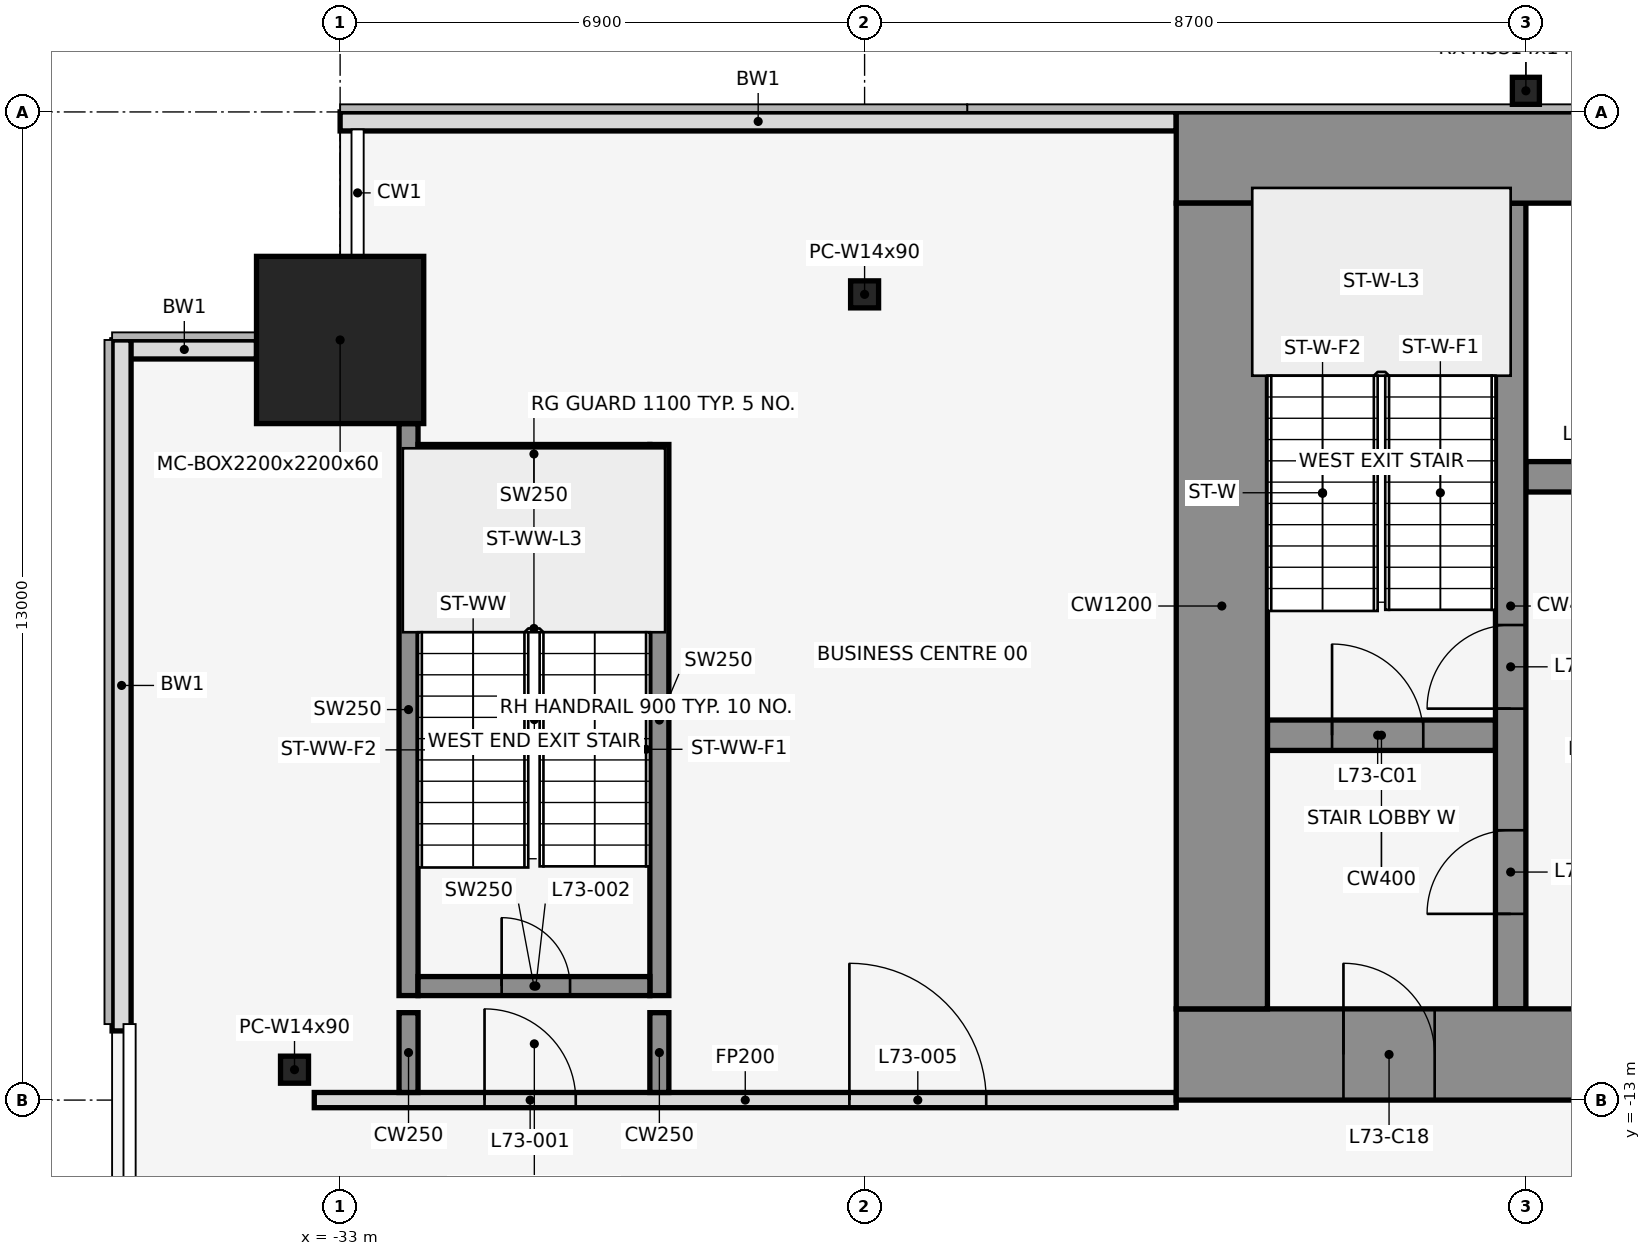
"""IFC4 building model, lengths in metres.
Left out: names, types, materials, properties, quantities, classifications, styles, units other than length and angle.
Written with IfcOpenShell. Run it as: python <this file> out.ifc"""

import sys

from ifc_helpers import new_model, si_unit, direction, frame, frame_2d, origin, origin_2d, place, context, subcontext, project, spatial, rectangle, hollow_rectangle, i_section, extrude, element, fill, save


model = new_model("IFC4")
c1 = context("Model", 3, precision=1e-05, world=origin(), true_north=direction((0.0, 1.0)))
c2 = subcontext(c1, "Body", "Model", "MODEL_VIEW")
j1 = project(units=[si_unit("LENGTHUNIT", "METRE"), si_unit("PLANEANGLEUNIT", "RADIAN")], contexts=[c1])
p1 = place(None, origin())
s1 = spatial("IfcSite", under=j1, at=p1, CompositionType="ELEMENT")
p2 = place(p1, origin())
s2 = spatial("IfcBuilding", under=s1, at=p2, CompositionType="ELEMENT")
p3 = place(p2, frame((0.0, 0.0, 324.5)))
s3 = spatial("IfcBuildingStorey", under=s2, at=p3, CompositionType="ELEMENT", Elevation=324.5)
p4 = place(p3, frame((-33.0, -3.0, 0.0), z_axis=(0.0, 0.0, 1.0), x_axis=(1.0, 0.0, 0.0)))
e1 = element("IfcColumn", 1, at=p4, inside=s3, PredefinedType="COLUMN", context=c2, shape_type="SweptSolid", body=[
    extrude(hollow_rectangle(XDim=2.2, YDim=2.2, WallThickness=0.06, at=origin_2d()), origin(), (0.0, 0.0, 1.0), 4.5),
])
p5 = place(p3, frame((-26.1, -2.4, 0.0), z_axis=(0.0, 0.0, 1.0), x_axis=(1.0, 0.0, 0.0)))
e2 = element("IfcColumn", 2, at=p5, inside=s3, PredefinedType="COLUMN", context=c2, shape_type="SweptSolid", body=[
    extrude(i_section(OverallWidth=0.368, OverallDepth=0.356, WebThickness=0.011, FlangeThickness=0.018, at=origin_2d()), origin(), (0.0, 0.0, 1.0), 4.5),
])
p6 = place(p3, frame((-17.4, 0.278, 0.0), z_axis=(0.0, 0.0, 1.0), x_axis=(1.0, 0.0, 0.0)))
e3 = element("IfcColumn", 3, at=p6, inside=s3, PredefinedType="COLUMN", context=c2, shape_type="SweptSolid", body=[
    extrude(hollow_rectangle(XDim=0.356, YDim=0.356, WallThickness=0.012, at=origin_2d()), origin(), (0.0, 0.0, 1.0), 4.5),
])
p7 = place(p3, frame((-33.6, -12.6, 0.0), z_axis=(0.0, 0.0, 1.0), x_axis=(1.0, 0.0, 0.0)))
e4 = element("IfcColumn", 4, at=p7, inside=s3, PredefinedType="COLUMN", context=c2, shape_type="SweptSolid", body=[
    extrude(i_section(OverallWidth=0.368, OverallDepth=0.356, WebThickness=0.011, FlangeThickness=0.018, at=origin_2d()), origin(), (0.0, 0.0, 1.0), 4.5),
])
p8 = place(p3, frame((-22.0, -0.125, 0.0), z_axis=(0.0, 0.0, 1.0), x_axis=(-1.0, 0.0, 0.0)))
e5 = element("IfcWall", 5, at=p8, inside=s3, PredefinedType="STANDARD", context=c2, shape_type="SweptSolid", body=[
    extrude(rectangle(XDim=11.0, YDim=0.25, at=frame_2d((5.5, 0.0))), origin(), (0.0, 0.0, 1.0), 4.35),
])
p9 = place(p3, frame((-34.1, -3.125, 0.0), z_axis=(0.0, 0.0, 1.0), x_axis=(-1.0, 0.0, 0.0)))
e6 = element("IfcWall", 6, at=p9, inside=s3, PredefinedType="STANDARD", context=c2, shape_type="SweptSolid", body=[
    extrude(rectangle(XDim=1.9, YDim=0.25, at=frame_2d((0.95, 0.0))), origin(), (0.0, 0.0, 1.0), 4.35),
])
p10 = place(p3, frame((-35.875, -3.0, 0.0), z_axis=(0.0, 0.0, 1.0), x_axis=(0.0, -1.0, 0.0)))
e7 = element("IfcWall", 7, at=p10, inside=s3, PredefinedType="STANDARD", context=c2, shape_type="SweptSolid", body=[
    extrude(rectangle(XDim=9.09, YDim=0.25, at=frame_2d((4.545, 0.0))), origin(), (0.0, 0.0, 1.0), 4.35),
])
p11 = place(p3, frame((-32.1, -11.625, 0.0), z_axis=(0.0, 0.0, 1.0), x_axis=(0.0, 1.0, 0.0)))
e8 = element("IfcWall", 8, at=p11, inside=s3, PredefinedType="SHEAR", context=c2, shape_type="SweptSolid", body=[
    extrude(rectangle(XDim=7.525, YDim=0.25, at=frame_2d((3.762, 0.0))), origin(), (0.0, 0.0, 1.0), 4.5),
])
p12 = place(p3, frame((-28.8, -11.625, 0.0), z_axis=(0.0, 0.0, 1.0), x_axis=(0.0, 1.0, 0.0)))
e9 = element("IfcWall", 9, at=p12, inside=s3, PredefinedType="SHEAR", context=c2, shape_type="SweptSolid", body=[
    extrude(rectangle(XDim=7.25, YDim=0.25, at=frame_2d((3.625, 0.0))), origin(), (0.0, 0.0, 1.0), 4.5),
])
p13 = place(p3, frame((-31.975, -11.5, 0.0), z_axis=(0.0, 0.0, 1.0), x_axis=(1.0, 0.0, 0.0)))
e10 = element("IfcWall", 10, at=p13, inside=s3, PredefinedType="SHEAR", context=c2, shape_type="SweptSolid", body=[
    extrude(rectangle(XDim=3.05, YDim=0.25, at=frame_2d((1.525, 0.0))), origin(), (0.0, 0.0, 1.0), 4.5),
])
p14 = place(p13, frame((1.1, 0.0, 0.0)))
e11 = element("IfcOpeningElement", 11, at=p14, cuts=e10, PredefinedType="OPENING", context=c2, shape_type="SweptSolid", body=[
    extrude(rectangle(XDim=0.9, YDim=2.1, at=frame_2d((0.45, 1.05))), frame((0.0, 0.137, 0.0), z_axis=(0.0, -1.0, 0.0), x_axis=(1.0, 0.0, 0.0)), (0.0, 0.0, 1.0), 0.274),
])
p15 = place(p3, frame((-31.975, -4.5, 0.0), z_axis=(0.0, 0.0, 1.0), x_axis=(1.0, 0.0, 0.0)))
e12 = element("IfcWall", 12, at=p15, inside=s3, PredefinedType="SHEAR", context=c2, shape_type="SweptSolid", body=[
    extrude(rectangle(XDim=3.05, YDim=0.25, at=frame_2d((1.525, 0.0))), origin(), (0.0, 0.0, 1.0), 4.5),
])
p16 = place(p3, frame((-33.34, -13.0, 0.0), z_axis=(0.0, 0.0, 1.0), x_axis=(1.0, 0.0, 0.0)))
e13 = element("IfcWall", 13, at=p16, inside=s3, PredefinedType="PARTITIONING", context=c2, shape_type="SweptSolid", body=[
    extrude(rectangle(XDim=11.34, YDim=0.2, at=frame_2d((5.67, 0.0))), origin(), (0.0, 0.0, 1.0), 3.418),
])
p17 = place(p16, frame((2.24, 0.0, 0.0)))
e14 = element("IfcOpeningElement", 14, at=p17, cuts=e13, PredefinedType="OPENING", context=c2, shape_type="SweptSolid", body=[
    extrude(rectangle(XDim=1.2, YDim=2.1, at=frame_2d((0.6, 1.05))), frame((0.0, 0.112, 0.0), z_axis=(0.0, -1.0, 0.0), x_axis=(1.0, 0.0, 0.0)), (0.0, 0.0, 1.0), 0.224),
])
p18 = place(p16, frame((7.04, 0.0, 0.0)))
e15 = element("IfcOpeningElement", 15, at=p18, cuts=e13, PredefinedType="OPENING", context=c2, shape_type="SweptSolid", body=[
    extrude(rectangle(XDim=1.8, YDim=2.1, at=frame_2d((0.9, 1.05))), frame((0.0, 0.112, 0.0), z_axis=(0.0, -1.0, 0.0), x_axis=(1.0, 0.0, 0.0)), (0.0, 0.0, 1.0), 0.224),
])
for number, where, z_axis, x_axis in (
    (16, (-32.1, -12.9, 0.0), (0.0, 0.0, 1.0), (0.0, 1.0, 0.0)),
    (17, (-28.8, -12.9, 0.0), (0.0, 0.0, 1.0), (0.0, 1.0, 0.0)),
):
    element("IfcWall", number, at=place(p3, frame(where, z_axis=z_axis, x_axis=x_axis)), inside=s3, PredefinedType="SHEAR", context=c2, shape_type="SweptSolid", body=[
        extrude(rectangle(XDim=1.05, YDim=0.25, at=frame_2d((0.525, 0.0))), origin(), (0.0, 0.0, 1.0), 4.5),
    ])
p19 = place(p3, frame((-20.8, -8.2, 0.0), z_axis=(0.0, 0.0, 1.0), x_axis=(1.0, 0.0, 0.0)))
e18 = element("IfcWall", 18, at=p19, inside=s3, PredefinedType="SHEAR", context=c2, shape_type="SweptSolid", body=[
    extrude(rectangle(XDim=3.0, YDim=0.4, at=frame_2d((1.5, 0.0))), origin(), (0.0, 0.0, 1.0), 4.5),
])
p20 = place(p19, frame((0.85, 0.0, 0.0)))
e19 = element("IfcOpeningElement", 19, at=p20, cuts=e18, PredefinedType="OPENING", context=c2, shape_type="SweptSolid", body=[
    extrude(rectangle(XDim=1.2, YDim=2.1, at=frame_2d((0.6, 1.05))), frame((0.0, 0.212, 0.0), z_axis=(0.0, -1.0, 0.0), x_axis=(1.0, 0.0, 0.0)), (0.0, 0.0, 1.0), 0.424),
])
p21 = place(p3, frame((-17.4, -4.8, 0.0), z_axis=(0.0, 0.0, 1.0), x_axis=(1.0, 0.0, 0.0)))
e20 = element("IfcWall", 20, at=p21, inside=s3, PredefinedType="SHEAR", context=c2, shape_type="SweptSolid", body=[
    extrude(rectangle(XDim=13.6, YDim=0.4, at=frame_2d((6.8, 0.0))), origin(), (0.0, 0.0, 1.0), 4.5),
])
p22 = place(p21, frame((0.65, 0.0, 0.0)))
e21 = element("IfcOpeningElement", 21, at=p22, cuts=e20, PredefinedType="OPENING", context=c2, shape_type="SweptSolid", body=[
    extrude(rectangle(XDim=1.1, YDim=2.1, at=frame_2d((0.55, 1.05))), frame((0.0, 0.212, 0.0), z_axis=(0.0, -1.0, 0.0), x_axis=(1.0, 0.0, 0.0)), (0.0, 0.0, 1.0), 0.424),
])
p23 = place(p21, frame((2.95, 0.0, 0.0)))
e22 = element("IfcOpeningElement", 22, at=p23, cuts=e20, PredefinedType="OPENING", context=c2, shape_type="SweptSolid", body=[
    extrude(rectangle(XDim=1.1, YDim=2.1, at=frame_2d((0.55, 1.05))), frame((0.0, 0.212, 0.0), z_axis=(0.0, -1.0, 0.0), x_axis=(1.0, 0.0, 0.0)), (0.0, 0.0, 1.0), 0.424),
])
p24 = place(p21, frame((5.85, 0.0, 0.0)))
e23 = element("IfcOpeningElement", 23, at=p24, cuts=e20, PredefinedType="OPENING", context=c2, shape_type="SweptSolid", body=[
    extrude(rectangle(XDim=0.9, YDim=2.1, at=frame_2d((0.45, 1.05))), frame((0.0, 0.212, 0.0), z_axis=(0.0, -1.0, 0.0), x_axis=(1.0, 0.0, 0.0)), (0.0, 0.0, 1.0), 0.424),
])
p25 = place(p21, frame((10.25, 0.0, 0.0)))
e24 = element("IfcOpeningElement", 24, at=p25, cuts=e20, PredefinedType="OPENING", context=c2, shape_type="SweptSolid", body=[
    extrude(rectangle(XDim=0.9, YDim=2.1, at=frame_2d((0.45, 1.05))), frame((0.0, 0.212, 0.0), z_axis=(0.0, -1.0, 0.0), x_axis=(1.0, 0.0, 0.0)), (0.0, 0.0, 1.0), 0.424),
])
p26 = place(p3, frame((-17.6, -11.8, 0.0), z_axis=(0.0, 0.0, 1.0), x_axis=(0.0, 1.0, 0.0)))
e25 = element("IfcWall", 25, at=p26, inside=s3, PredefinedType="SHEAR", context=c2, shape_type="SweptSolid", body=[
    extrude(rectangle(XDim=10.6, YDim=0.4, at=frame_2d((5.3, 0.0))), origin(), (0.0, 0.0, 1.0), 4.5),
])
p27 = place(p26, frame((1.25, 0.0, 0.0)))
e26 = element("IfcOpeningElement", 26, at=p27, cuts=e25, PredefinedType="OPENING", context=c2, shape_type="SweptSolid", body=[
    extrude(rectangle(XDim=1.1, YDim=2.1, at=frame_2d((0.55, 1.05))), frame((0.0, 0.212, 0.0), z_axis=(0.0, -1.0, 0.0), x_axis=(1.0, 0.0, 0.0)), (0.0, 0.0, 1.0), 0.424),
])
p28 = place(p26, frame((3.95, 0.0, 0.0)))
e27 = element("IfcOpeningElement", 27, at=p28, cuts=e25, PredefinedType="OPENING", context=c2, shape_type="SweptSolid", body=[
    extrude(rectangle(XDim=1.1, YDim=2.1, at=frame_2d((0.55, 1.05))), frame((0.0, 0.212, 0.0), z_axis=(0.0, -1.0, 0.0), x_axis=(1.0, 0.0, 0.0)), (0.0, 0.0, 1.0), 0.424),
])
p29 = place(p3, frame((-22.0, -0.6, 0.0), z_axis=(0.0, 0.0, 1.0), x_axis=(1.0, 0.0, 0.0)))
e28 = element("IfcWall", 28, at=p29, inside=s3, PredefinedType="SHEAR", context=c2, shape_type="SweptSolid", body=[
    extrude(rectangle(XDim=44.0, YDim=1.2, at=frame_2d((22.0, 0.0))), origin(), (0.0, 0.0, 1.0), 4.5),
])
p30 = place(p29, frame((18.55, 0.0, 0.0)))
e29 = element("IfcOpeningElement", 29, at=p30, cuts=e28, PredefinedType="OPENING", context=c2, shape_type="SweptSolid", body=[
    extrude(rectangle(XDim=0.9, YDim=2.1, at=frame_2d((0.45, 1.05))), frame((0.0, 0.612, 0.0), z_axis=(0.0, -1.0, 0.0), x_axis=(1.0, 0.0, 0.0)), (0.0, 0.0, 1.0), 1.224),
])
p31 = place(p29, frame((24.55, 0.0, 0.0)))
e30 = element("IfcOpeningElement", 30, at=p31, cuts=e28, PredefinedType="OPENING", context=c2, shape_type="SweptSolid", body=[
    extrude(rectangle(XDim=0.9, YDim=2.1, at=frame_2d((0.45, 1.05))), frame((0.0, 0.612, 0.0), z_axis=(0.0, -1.0, 0.0), x_axis=(1.0, 0.0, 0.0)), (0.0, 0.0, 1.0), 1.224),
])
p32 = place(p3, frame((-22.0, -12.4, 0.0), z_axis=(0.0, 0.0, 1.0), x_axis=(1.0, 0.0, 0.0)))
e31 = element("IfcWall", 31, at=p32, inside=s3, PredefinedType="SHEAR", context=c2, shape_type="SweptSolid", body=[
    extrude(rectangle(XDim=44.0, YDim=1.2, at=frame_2d((22.0, 0.0))), origin(), (0.0, 0.0, 1.0), 4.5),
])
p33 = place(p32, frame((2.2, 0.0, 0.0)))
e32 = element("IfcOpeningElement", 32, at=p33, cuts=e31, PredefinedType="OPENING", context=c2, shape_type="SweptSolid", body=[
    extrude(rectangle(XDim=1.2, YDim=2.1, at=frame_2d((0.6, 1.05))), frame((0.0, 0.612, 0.0), z_axis=(0.0, -1.0, 0.0), x_axis=(1.0, 0.0, 0.0)), (0.0, 0.0, 1.0), 1.224),
])
p34 = place(p32, frame((21.4, 0.0, 0.0)))
e33 = element("IfcOpeningElement", 33, at=p34, cuts=e31, PredefinedType="OPENING", context=c2, shape_type="SweptSolid", body=[
    extrude(rectangle(XDim=1.2, YDim=2.1, at=frame_2d((0.6, 1.05))), frame((0.0, 0.612, 0.0), z_axis=(0.0, -1.0, 0.0), x_axis=(1.0, 0.0, 0.0)), (0.0, 0.0, 1.0), 1.224),
])
p35 = place(p32, frame((40.6, 0.0, 0.0)))
e34 = element("IfcOpeningElement", 34, at=p35, cuts=e31, PredefinedType="OPENING", context=c2, shape_type="SweptSolid", body=[
    extrude(rectangle(XDim=1.2, YDim=2.1, at=frame_2d((0.6, 1.05))), frame((0.0, 0.612, 0.0), z_axis=(0.0, -1.0, 0.0), x_axis=(1.0, 0.0, 0.0)), (0.0, 0.0, 1.0), 1.224),
])
p36 = place(p32, frame((16.0, 0.0, 0.0)))
e35 = element("IfcOpeningElement", 35, at=p36, cuts=e31, PredefinedType="OPENING", context=c2, shape_type="SweptSolid", body=[
    extrude(rectangle(XDim=1.8, YDim=2.1, at=frame_2d((0.9, 1.05))), frame((0.0, 0.612, 0.0), z_axis=(0.0, -1.0, 0.0), x_axis=(1.0, 0.0, 0.0)), (0.0, 0.0, 1.0), 1.224),
])
p37 = place(p32, frame((6.3, 0.0, 0.0)))
e36 = element("IfcOpeningElement", 36, at=p37, cuts=e31, PredefinedType="OPENING", context=c2, shape_type="SweptSolid", body=[
    extrude(rectangle(XDim=1.2, YDim=2.1, at=frame_2d((0.6, 1.05))), frame((0.0, 0.612, 0.0), z_axis=(0.0, -1.0, 0.0), x_axis=(1.0, 0.0, 0.0)), (0.0, 0.0, 1.0), 1.224),
])
p38 = place(p32, frame((26.2, 0.0, 0.0)))
e37 = element("IfcOpeningElement", 37, at=p38, cuts=e31, PredefinedType="OPENING", context=c2, shape_type="SweptSolid", body=[
    extrude(rectangle(XDim=1.8, YDim=2.1, at=frame_2d((0.9, 1.05))), frame((0.0, 0.612, 0.0), z_axis=(0.0, -1.0, 0.0), x_axis=(1.0, 0.0, 0.0)), (0.0, 0.0, 1.0), 1.224),
])
p39 = place(p32, frame((36.5, 0.0, 0.0)))
e38 = element("IfcOpeningElement", 38, at=p39, cuts=e31, PredefinedType="OPENING", context=c2, shape_type="SweptSolid", body=[
    extrude(rectangle(XDim=1.2, YDim=2.1, at=frame_2d((0.6, 1.05))), frame((0.0, 0.612, 0.0), z_axis=(0.0, -1.0, 0.0), x_axis=(1.0, 0.0, 0.0)), (0.0, 0.0, 1.0), 1.224),
])
p40 = place(p3, frame((-21.4, -11.8, 0.0), z_axis=(0.0, 0.0, 1.0), x_axis=(0.0, 1.0, 0.0)))
e39 = element("IfcWall", 39, at=p40, inside=s3, PredefinedType="SHEAR", context=c2, shape_type="SweptSolid", body=[
    extrude(rectangle(XDim=10.6, YDim=1.2, at=frame_2d((5.3, 0.0))), origin(), (0.0, 0.0, 1.0), 4.5),
])
p41 = place(p17, origin())
e40 = element("IfcDoor", 40, at=p41, inside=s3, OperationType="SINGLE_SWING_LEFT", PredefinedType="DOOR", context=c2, shape_type="SweptSolid", body=[
    extrude(rectangle(XDim=1.2, YDim=2.1, at=frame_2d((0.6, 1.05))), frame((0.0, 0.025, 0.0), z_axis=(0.0, -1.0, 0.0), x_axis=(1.0, 0.0, 0.0)), (0.0, 0.0, 1.0), 0.05),
])
fill(e14, e40)
p42 = place(p14, origin())
e41 = element("IfcDoor", 41, at=p42, inside=s3, OperationType="SINGLE_SWING_LEFT", PredefinedType="DOOR", context=c2, shape_type="SweptSolid", body=[
    extrude(rectangle(XDim=0.9, YDim=2.1, at=frame_2d((0.45, 1.05))), frame((0.0, 0.025, 0.0), z_axis=(0.0, -1.0, 0.0), x_axis=(1.0, 0.0, 0.0)), (0.0, 0.0, 1.0), 0.05),
])
fill(e11, e41)
p43 = place(p18, origin())
e42 = element("IfcDoor", 42, at=p43, inside=s3, OperationType="SINGLE_SWING_LEFT", PredefinedType="DOOR", context=c2, shape_type="SweptSolid", body=[
    extrude(rectangle(XDim=1.8, YDim=2.1, at=frame_2d((0.9, 1.05))), frame((0.0, 0.025, 0.0), z_axis=(0.0, -1.0, 0.0), x_axis=(1.0, 0.0, 0.0)), (0.0, 0.0, 1.0), 0.05),
])
fill(e15, e42)
p44 = place(p20, origin())
e43 = element("IfcDoor", 43, at=p44, inside=s3, OperationType="SINGLE_SWING_LEFT", PredefinedType="DOOR", context=c2, shape_type="SweptSolid", body=[
    extrude(rectangle(XDim=1.2, YDim=2.1, at=frame_2d((0.6, 1.05))), frame((0.0, 0.025, 0.0), z_axis=(0.0, -1.0, 0.0), x_axis=(1.0, 0.0, 0.0)), (0.0, 0.0, 1.0), 0.05),
])
fill(e19, e43)
p45 = place(p27, frame((1.1, 0.0, 0.0), z_axis=(0.0, 0.0, 1.0), x_axis=(-1.0, 0.0, 0.0)))
e44 = element("IfcDoor", 44, at=p45, inside=s3, OperationType="SINGLE_SWING_LEFT", PredefinedType="DOOR", context=c2, shape_type="SweptSolid", body=[
    extrude(rectangle(XDim=1.1, YDim=2.1, at=frame_2d((0.55, 1.05))), frame((0.0, 0.025, 0.0), z_axis=(0.0, -1.0, 0.0), x_axis=(1.0, 0.0, 0.0)), (0.0, 0.0, 1.0), 0.05),
])
fill(e26, e44)
p46 = place(p28, frame((1.1, 0.0, 0.0), z_axis=(0.0, 0.0, 1.0), x_axis=(-1.0, 0.0, 0.0)))
e45 = element("IfcDoor", 45, at=p46, inside=s3, OperationType="SINGLE_SWING_LEFT", PredefinedType="DOOR", context=c2, shape_type="SweptSolid", body=[
    extrude(rectangle(XDim=1.1, YDim=2.1, at=frame_2d((0.55, 1.05))), frame((0.0, 0.025, 0.0), z_axis=(0.0, -1.0, 0.0), x_axis=(1.0, 0.0, 0.0)), (0.0, 0.0, 1.0), 0.05),
])
fill(e27, e45)
p47 = place(p33, frame((1.2, 0.0, 0.0), z_axis=(0.0, 0.0, 1.0), x_axis=(-1.0, 0.0, 0.0)))
e46 = element("IfcDoor", 46, at=p47, inside=s3, OperationType="SINGLE_SWING_RIGHT", PredefinedType="DOOR", context=c2, shape_type="SweptSolid", body=[
    extrude(rectangle(XDim=1.2, YDim=2.1, at=frame_2d((0.6, 1.05))), frame((0.0, 0.025, 0.0), z_axis=(0.0, -1.0, 0.0), x_axis=(1.0, 0.0, 0.0)), (0.0, 0.0, 1.0), 0.05),
])
fill(e32, e46)
save(model, sys.argv[1])
